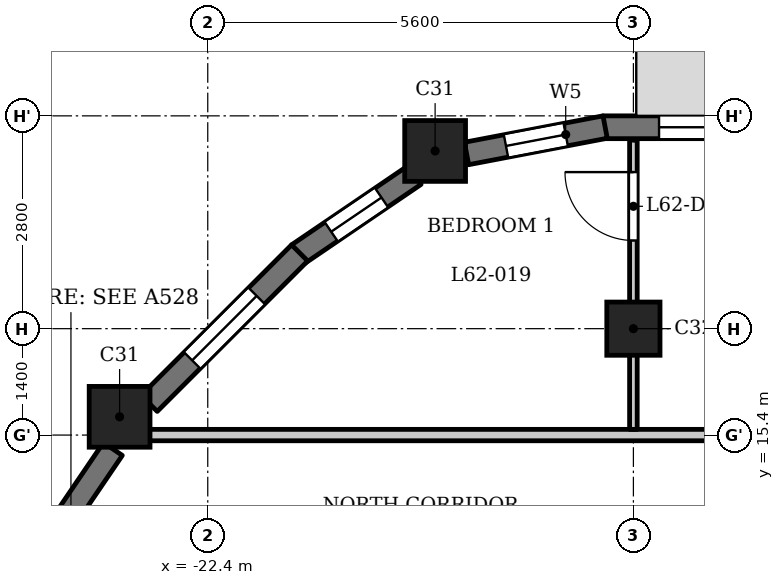
"""IFC4 building model, lengths in metres.
Left out: names, types, materials, properties, quantities, classifications, styles, units other than length and angle.
Written with IfcOpenShell. Run it as: python <this file> out.ifc"""

import sys

from ifc_helpers import new_model, si_unit, direction, frame, frame_2d, origin, origin_2d, place, context, subcontext, project, spatial, rectangle, extrude, element, fill, save


model = new_model("IFC4")
c1 = context("Model", 3, precision=1e-05, world=origin(), true_north=direction((0.0, 1.0)))
c2 = subcontext(c1, "Body", "Model", "MODEL_VIEW")
j1 = project(units=[si_unit("LENGTHUNIT", "METRE"), si_unit("PLANEANGLEUNIT", "RADIAN")], contexts=[c1])
p1 = place(None, origin())
s1 = spatial("IfcSite", under=j1, at=p1, CompositionType="ELEMENT")
p2 = place(p1, origin())
s2 = spatial("IfcBuilding", under=s1, at=p2, CompositionType="ELEMENT")
p3 = place(p2, frame((0.0, 0.0, 241.7)))
s3 = spatial("IfcBuildingStorey", under=s2, at=p3, CompositionType="ELEMENT", Elevation=241.7)
for number, where, z_axis, x_axis in (
    (1, (-19.409, 19.138, 0.0), (0.0, 0.0, 1.0), (1.0, 0.0, 0.0)),
    (2, (-23.56, 15.64, 0.0), (0.0, 0.0, 1.0), (1.0, 0.0, 0.0)),
):
    element("IfcColumn", number, at=place(p3, frame(where, z_axis=z_axis, x_axis=x_axis)), inside=s3, PredefinedType="COLUMN", context=c2, shape_type="SweptSolid", body=[
        extrude(rectangle(XDim=0.8, YDim=0.8, at=origin_2d()), origin(), (0.0, 0.0, 1.0), 3.5),
    ])
p4 = place(p3, frame((-16.8, 16.8, 0.0), z_axis=(0.0, 0.0, 1.0), x_axis=(1.0, 0.0, 0.0)))
e3 = element("IfcColumn", 3, at=p4, inside=s3, PredefinedType="COLUMN", context=c2, shape_type="SweptSolid", body=[
    extrude(rectangle(XDim=0.7, YDim=0.7, at=origin_2d()), origin(), (0.0, 0.0, 1.0), 3.5),
])
p5 = place(p3, frame((-14.4, 19.45, 0.0), z_axis=(0.0, 0.0, 1.0), x_axis=(-1.0, 0.0, 0.0)))
e4 = element("IfcWall", 4, at=p5, inside=s3, PredefinedType="SOLIDWALL", context=c2, shape_type="SweptSolid", body=[
    extrude(rectangle(XDim=2.8, YDim=0.3, at=frame_2d((1.4, 0.0))), origin(), (0.0, 0.0, 1.0), 2.55),
])
p6 = place(p5, frame((0.262, 0.0, 0.9)))
e5 = element("IfcOpeningElement", 5, at=p6, cuts=e4, PredefinedType="OPENING", context=c2, shape_type="SweptSolid", body=[
    extrude(rectangle(XDim=1.8, YDim=1.25, at=frame_2d((0.9, 0.625))), frame((0.0, 0.16, 0.0), z_axis=(0.0, -1.0, 0.0), x_axis=(1.0, 0.0, 0.0)), (0.0, 0.0, 1.0), 0.32),
])
p7 = place(p3, frame((-17.172, 19.453, 0.0), z_axis=(0.0, 0.0, 1.0), x_axis=(-0.982301706131, -0.187305520826, 0.0)))
e6 = element("IfcWall", 6, at=p7, inside=s3, PredefinedType="SOLIDWALL", context=c2, shape_type="SweptSolid", body=[
    extrude(rectangle(XDim=1.856, YDim=0.3, at=frame_2d((0.928, 0.0))), origin(), (0.0, 0.0, 1.0), 2.55),
])
p8 = place(p7, frame((0.528, 0.0, 0.6)))
e7 = element("IfcOpeningElement", 7, at=p8, cuts=e6, PredefinedType="OPENING", context=c2, shape_type="SweptSolid", body=[
    extrude(rectangle(XDim=0.8, YDim=1.55, at=frame_2d((0.4, 0.775))), frame((0.0, 0.16, 0.0), z_axis=(0.0, -1.0, 0.0), x_axis=(1.0, 0.0, 0.0)), (0.0, 0.0, 1.0), 0.32),
])
p9 = place(p3, frame((-19.678, 18.822, 0.0), z_axis=(0.0, 0.0, 1.0), x_axis=(-0.826997446962, -0.562205676526, 0.0)))
e8 = element("IfcWall", 8, at=p9, inside=s3, PredefinedType="SOLIDWALL", context=c2, shape_type="SweptSolid", body=[
    extrude(rectangle(XDim=1.856, YDim=0.3, at=frame_2d((0.928, 0.0))), origin(), (0.0, 0.0, 1.0), 2.55),
])
p10 = place(p9, frame((0.528, 0.0, 0.6)))
e9 = element("IfcOpeningElement", 9, at=p10, cuts=e8, PredefinedType="OPENING", context=c2, shape_type="SweptSolid", body=[
    extrude(rectangle(XDim=0.8, YDim=1.55, at=frame_2d((0.4, 0.775))), frame((0.0, 0.16, 0.0), z_axis=(0.0, -1.0, 0.0), x_axis=(1.0, 0.0, 0.0)), (0.0, 0.0, 1.0), 0.32),
])
p11 = place(p3, frame((-21.191, 17.797, 0.0), z_axis=(0.0, 0.0, 1.0), x_axis=(-0.707106781187, -0.707106781187, 0.0)))
e10 = element("IfcWall", 10, at=p11, inside=s3, PredefinedType="SOLIDWALL", context=c2, shape_type="SweptSolid", body=[
    extrude(rectangle(XDim=2.8, YDim=0.3, at=frame_2d((1.4, 0.0))), origin(), (0.0, 0.0, 1.0), 2.55),
])
p12 = place(p11, frame((0.8, 0.0, 0.6)))
e11 = element("IfcOpeningElement", 11, at=p12, cuts=e10, PredefinedType="OPENING", context=c2, shape_type="SweptSolid", body=[
    extrude(rectangle(XDim=1.2, YDim=1.55, at=frame_2d((0.6, 0.775))), frame((0.0, 0.16, 0.0), z_axis=(0.0, -1.0, 0.0), x_axis=(1.0, 0.0, 0.0)), (0.0, 0.0, 1.0), 0.32),
])
p13 = place(p3, frame((-23.648, 15.217, 0.0), z_axis=(0.0, 0.0, 1.0), x_axis=(-0.562043265151, -0.827107833416, 0.0)))
e12 = element("IfcWall", 12, at=p13, inside=s3, PredefinedType="SOLIDWALL", context=c2, shape_type="SweptSolid", body=[
    extrude(rectangle(XDim=1.377, YDim=0.3, at=frame_2d((0.688, 0.0))), origin(), (0.0, 0.0, 1.0), 2.55),
])
p14 = place(p3, frame((-23.55, 15.4, 0.0), z_axis=(0.0, 0.0, 1.0), x_axis=(1.0, 0.0, 0.0)))
e13 = element("IfcWall", 13, at=p14, inside=s3, PredefinedType="PARTITIONING", context=c2, shape_type="SweptSolid", body=[
    extrude(rectangle(XDim=46.872, YDim=0.15, at=frame_2d((23.436, 0.0))), origin(), (0.0, 0.0, 1.0), 3.2),
])
p15 = place(p14, frame((12.9, 0.0, 0.0)))
e14 = element("IfcOpeningElement", 14, at=p15, cuts=e13, PredefinedType="OPENING", context=c2, shape_type="SweptSolid", body=[
    extrude(rectangle(XDim=1.0, YDim=2.1, at=frame_2d((0.5, 1.05))), frame((0.0, 0.085, 0.0), z_axis=(0.0, -1.0, 0.0), x_axis=(1.0, 0.0, 0.0)), (0.0, 0.0, 1.0), 0.17),
])
p16 = place(p14, frame((20.9, 0.0, 0.0)))
e15 = element("IfcOpeningElement", 15, at=p16, cuts=e13, PredefinedType="OPENING", context=c2, shape_type="SweptSolid", body=[
    extrude(rectangle(XDim=1.0, YDim=2.1, at=frame_2d((0.5, 1.05))), frame((0.0, 0.085, 0.0), z_axis=(0.0, -1.0, 0.0), x_axis=(1.0, 0.0, 0.0)), (0.0, 0.0, 1.0), 0.17),
])
p17 = place(p14, frame((37.7, 0.0, 0.0)))
e16 = element("IfcOpeningElement", 16, at=p17, cuts=e13, PredefinedType="OPENING", context=c2, shape_type="SweptSolid", body=[
    extrude(rectangle(XDim=1.0, YDim=2.1, at=frame_2d((0.5, 1.05))), frame((0.0, 0.085, 0.0), z_axis=(0.0, -1.0, 0.0), x_axis=(1.0, 0.0, 0.0)), (0.0, 0.0, 1.0), 0.17),
])
p18 = place(p3, frame((-16.8, 15.475, 0.0), z_axis=(0.0, 0.0, 1.0), x_axis=(0.0, 1.0, 0.0)))
e17 = element("IfcWall", 17, at=p18, inside=s3, PredefinedType="PARTITIONING", context=c2, shape_type="SweptSolid", body=[
    extrude(rectangle(XDim=3.805, YDim=0.1, at=frame_2d((1.902, 0.0))), origin(), (0.0, 0.0, 1.0), 3.2),
])
p19 = place(p18, frame((2.485, 0.0, 0.0)))
e18 = element("IfcOpeningElement", 18, at=p19, cuts=e17, PredefinedType="OPENING", context=c2, shape_type="SweptSolid", body=[
    extrude(rectangle(XDim=0.9, YDim=2.1, at=frame_2d((0.45, 1.05))), frame((0.0, 0.06, 0.0), z_axis=(0.0, -1.0, 0.0), x_axis=(1.0, 0.0, 0.0)), (0.0, 0.0, 1.0), 0.12),
])
p20 = place(p19, origin())
e19 = element("IfcDoor", 19, at=p20, inside=s3, OperationType="SINGLE_SWING_LEFT", PredefinedType="DOOR", context=c2, shape_type="SweptSolid", body=[
    extrude(rectangle(XDim=0.9, YDim=2.1, at=frame_2d((0.45, 1.05))), frame((0.0, 0.025, 0.0), z_axis=(0.0, -1.0, 0.0), x_axis=(1.0, 0.0, 0.0)), (0.0, 0.0, 1.0), 0.05),
])
fill(e18, e19)
p21 = place(p6, origin())
e20 = element("IfcWindow", 20, at=p21, inside=s3, PartitioningType="SINGLE_PANEL", PredefinedType="WINDOW", context=c2, shape_type="SweptSolid", body=[
    extrude(rectangle(XDim=1.8, YDim=1.25, at=frame_2d((0.9, 0.625))), frame((0.0, 0.03, 0.0), z_axis=(0.0, -1.0, 0.0), x_axis=(1.0, 0.0, 0.0)), (0.0, 0.0, 1.0), 0.06),
])
fill(e5, e20)
p22 = place(p8, origin())
e21 = element("IfcWindow", 21, at=p22, inside=s3, PartitioningType="SINGLE_PANEL", PredefinedType="WINDOW", context=c2, shape_type="SweptSolid", body=[
    extrude(rectangle(XDim=0.8, YDim=1.55, at=frame_2d((0.4, 0.775))), frame((0.0, 0.03, 0.0), z_axis=(0.0, -1.0, 0.0), x_axis=(1.0, 0.0, 0.0)), (0.0, 0.0, 1.0), 0.06),
])
fill(e7, e21)
p23 = place(p10, origin())
e22 = element("IfcWindow", 22, at=p23, inside=s3, PartitioningType="SINGLE_PANEL", PredefinedType="WINDOW", context=c2, shape_type="SweptSolid", body=[
    extrude(rectangle(XDim=0.8, YDim=1.55, at=frame_2d((0.4, 0.775))), frame((0.0, 0.03, 0.0), z_axis=(0.0, -1.0, 0.0), x_axis=(1.0, 0.0, 0.0)), (0.0, 0.0, 1.0), 0.06),
])
fill(e9, e22)
p24 = place(p12, origin())
e23 = element("IfcWindow", 23, at=p24, inside=s3, PartitioningType="SINGLE_PANEL", PredefinedType="WINDOW", context=c2, shape_type="SweptSolid", body=[
    extrude(rectangle(XDim=1.2, YDim=1.55, at=frame_2d((0.6, 0.775))), frame((0.0, 0.03, 0.0), z_axis=(0.0, -1.0, 0.0), x_axis=(1.0, 0.0, 0.0)), (0.0, 0.0, 1.0), 0.06),
])
fill(e11, e23)
save(model, sys.argv[1])
